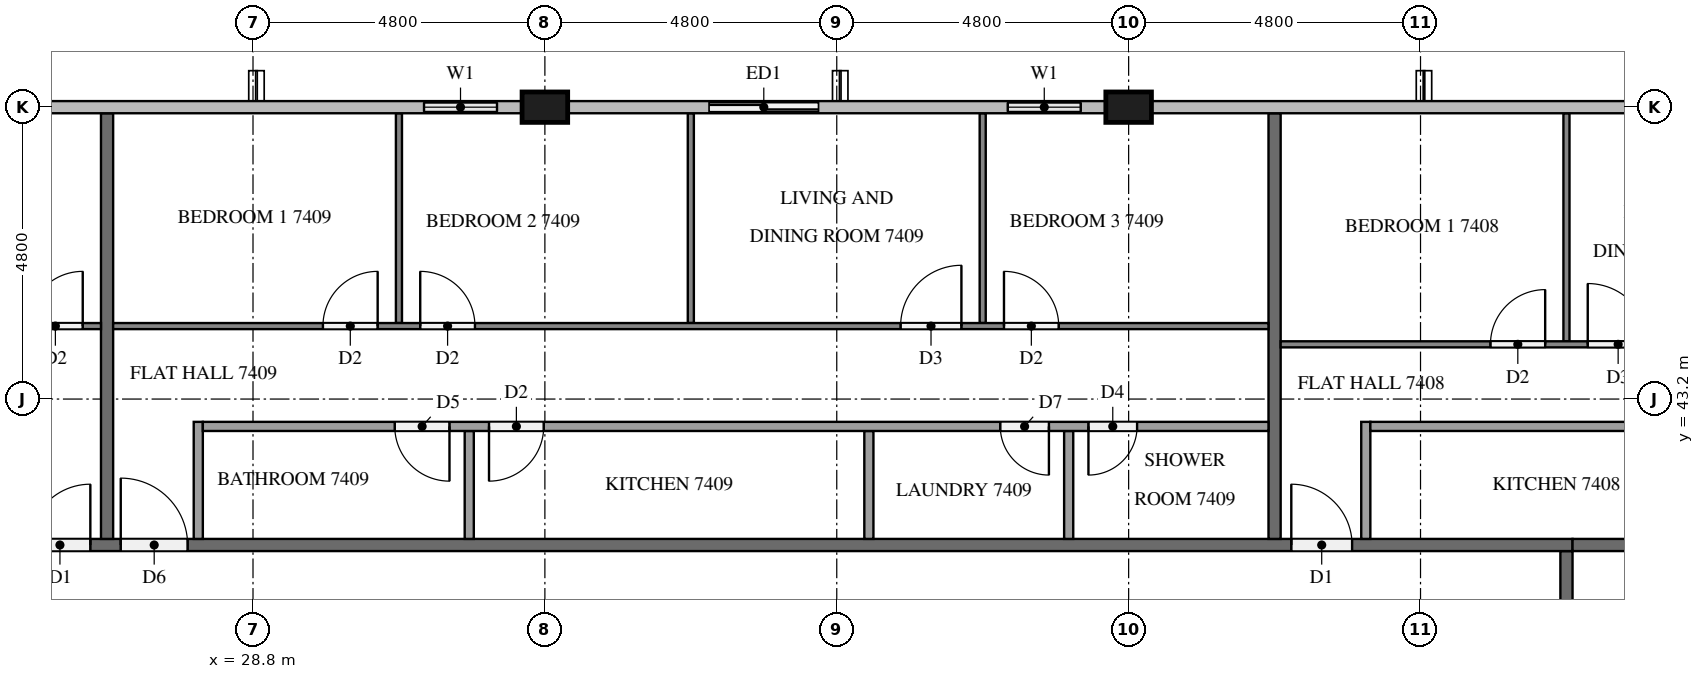
"""IFC4 building model, lengths in metres.
Left out: names, types, materials, properties, quantities, classifications, styles, units other than length and angle.
Written with IfcOpenShell. Run it as: python <this file> out.ifc"""

import sys

from ifc_helpers import new_model, si_unit, direction, frame, frame_2d, origin, origin_2d, place, context, subcontext, project, spatial, rectangle, extrude, element, fill, save


model = new_model("IFC4")
c1 = context("Model", 3, precision=1e-05, world=origin(), true_north=direction((0.0, 1.0)))
c2 = subcontext(c1, "Body", "Model", "MODEL_VIEW")
j1 = project(units=[si_unit("LENGTHUNIT", "METRE"), si_unit("PLANEANGLEUNIT", "RADIAN")], contexts=[c1])
p1 = place(None, origin())
s1 = spatial("IfcSite", under=j1, at=p1, CompositionType="ELEMENT")
p2 = place(p1, origin())
s2 = spatial("IfcBuilding", under=s1, at=p2, CompositionType="ELEMENT")
p3 = place(p2, frame((0.0, 0.0, 282.6)))
s3 = spatial("IfcBuildingStorey", under=s2, at=p3, CompositionType="ELEMENT", Elevation=282.6)
for number, where, z_axis, x_axis in (
    (1, (43.2, 48.0, 0.0), (0.0, 0.0, 1.0), (1.0, 0.0, 0.0)),
    (2, (33.6, 48.0, 0.0), (0.0, 0.0, 1.0), (1.0, 0.0, 0.0)),
):
    element("IfcColumn", number, at=place(p3, frame(where, z_axis=z_axis, x_axis=x_axis)), inside=s3, PredefinedType="COLUMN", context=c2, shape_type="SweptSolid", body=[
        extrude(rectangle(XDim=0.75, YDim=0.5, at=origin_2d()), origin(), (0.0, 0.0, 1.0), 3.2),
    ])
p4 = place(p3, frame((42.825, 48.0, 0.0), z_axis=(0.0, 0.0, 1.0), x_axis=(-1.0, 0.0, 0.0)))
e3 = element("IfcWall", 3, at=p4, inside=s3, PredefinedType="SOLIDWALL", context=c2, shape_type="SweptSolid", body=[
    extrude(rectangle(XDim=2.025, YDim=0.15, at=frame_2d((1.012, 0.0))), origin(), (0.0, 0.0, 1.0), 3.2),
])
p5 = place(p4, frame((0.413, 0.0, 0.9)))
e4 = element("IfcOpeningElement", 4, at=p5, cuts=e3, PredefinedType="OPENING", context=c2, shape_type="SweptSolid", body=[
    extrude(rectangle(XDim=1.2, YDim=1.4, at=frame_2d((0.6, 0.7))), frame((0.0, 0.085, 0.0), z_axis=(0.0, -1.0, 0.0), x_axis=(1.0, 0.0, 0.0)), (0.0, 0.0, 1.0), 0.17),
])
p6 = place(p3, frame((38.4, 48.0, 0.0), z_axis=(0.0, 0.0, 1.0), x_axis=(-1.0, 0.0, 0.0)))
e5 = element("IfcWall", 5, at=p6, inside=s3, PredefinedType="SOLIDWALL", context=c2, shape_type="SweptSolid", body=[
    extrude(rectangle(XDim=2.4, YDim=0.15, at=frame_2d((1.2, 0.0))), origin(), (0.0, 0.0, 1.0), 3.2),
])
p7 = place(p6, frame((0.3, 0.0, 0.0)))
e6 = element("IfcOpeningElement", 6, at=p7, cuts=e5, PredefinedType="OPENING", context=c2, shape_type="SweptSolid", body=[
    extrude(rectangle(XDim=1.8, YDim=2.4, at=frame_2d((0.9, 1.2))), frame((0.0, 0.085, 0.0), z_axis=(0.0, -1.0, 0.0), x_axis=(1.0, 0.0, 0.0)), (0.0, 0.0, 1.0), 0.17),
])
p8 = place(p3, frame((33.225, 48.0, 0.0), z_axis=(0.0, 0.0, 1.0), x_axis=(-1.0, 0.0, 0.0)))
e7 = element("IfcWall", 7, at=p8, inside=s3, PredefinedType="SOLIDWALL", context=c2, shape_type="SweptSolid", body=[
    extrude(rectangle(XDim=2.025, YDim=0.15, at=frame_2d((1.013, 0.0))), origin(), (0.0, 0.0, 1.0), 3.2),
])
p9 = place(p8, frame((0.413, 0.0, 0.9)))
e8 = element("IfcOpeningElement", 8, at=p9, cuts=e7, PredefinedType="OPENING", context=c2, shape_type="SweptSolid", body=[
    extrude(rectangle(XDim=1.2, YDim=1.4, at=frame_2d((0.6, 0.7))), frame((0.0, 0.085, 0.0), z_axis=(0.0, -1.0, 0.0), x_axis=(1.0, 0.0, 0.0)), (0.0, 0.0, 1.0), 0.17),
])
p10 = place(p3, frame((50.4, 40.7, 0.0), z_axis=(0.0, 0.0, 1.0), x_axis=(0.0, -1.0, 0.0)))
e9 = element("IfcWall", 9, at=p10, inside=s3, PredefinedType="PARTITIONING", context=c2, shape_type="SweptSolid", body=[
    extrude(rectangle(XDim=28.6, YDim=0.2, at=frame_2d((14.3, 0.0))), origin(), (0.0, 0.0, 1.0), 3.2),
])
p11 = place(p10, frame((27.425, 0.0, 0.0)))
e10 = element("IfcOpeningElement", 10, at=p11, cuts=e9, PredefinedType="OPENING", context=c2, shape_type="SweptSolid", body=[
    extrude(rectangle(XDim=1.0, YDim=2.1, at=frame_2d((0.5, 1.05))), frame((0.0, 0.11, 0.0), z_axis=(0.0, -1.0, 0.0), x_axis=(1.0, 0.0, 0.0)), (0.0, 0.0, 1.0), 0.22),
])
p12 = place(p10, frame((13.025, 0.0, 0.0)))
e11 = element("IfcOpeningElement", 11, at=p12, cuts=e9, PredefinedType="OPENING", context=c2, shape_type="SweptSolid", body=[
    extrude(rectangle(XDim=1.0, YDim=2.1, at=frame_2d((0.5, 1.05))), frame((0.0, 0.11, 0.0), z_axis=(0.0, -1.0, 0.0), x_axis=(1.0, 0.0, 0.0)), (0.0, 0.0, 1.0), 0.22),
])
p13 = place(p3, frame((11.9, 40.8, 0.0), z_axis=(0.0, 0.0, 1.0), x_axis=(1.0, 0.0, 0.0)))
e12 = element("IfcWall", 12, at=p13, inside=s3, PredefinedType="PARTITIONING", context=c2, shape_type="SweptSolid", body=[
    extrude(rectangle(XDim=38.6, YDim=0.2, at=frame_2d((19.3, 0.0))), origin(), (0.0, 0.0, 1.0), 3.2),
])
p14 = place(p13, frame((33.975, 0.0, 0.0)))
e13 = element("IfcOpeningElement", 13, at=p14, cuts=e12, PredefinedType="OPENING", context=c2, shape_type="SweptSolid", body=[
    extrude(rectangle(XDim=1.0, YDim=2.1, at=frame_2d((0.5, 1.05))), frame((0.0, 0.11, 0.0), z_axis=(0.0, -1.0, 0.0), x_axis=(1.0, 0.0, 0.0)), (0.0, 0.0, 1.0), 0.22),
])
p15 = place(p13, frame((14.725, 0.0, 0.0)))
e14 = element("IfcOpeningElement", 14, at=p15, cuts=e12, PredefinedType="OPENING", context=c2, shape_type="SweptSolid", body=[
    extrude(rectangle(XDim=1.1, YDim=2.1, at=frame_2d((0.55, 1.05))), frame((0.0, 0.11, 0.0), z_axis=(0.0, -1.0, 0.0), x_axis=(1.0, 0.0, 0.0)), (0.0, 0.0, 1.0), 0.22),
])
p16 = place(p13, frame((13.225, 0.0, 0.0)))
e15 = element("IfcOpeningElement", 15, at=p16, cuts=e12, PredefinedType="OPENING", context=c2, shape_type="SweptSolid", body=[
    extrude(rectangle(XDim=1.0, YDim=2.1, at=frame_2d((0.5, 1.05))), frame((0.0, 0.11, 0.0), z_axis=(0.0, -1.0, 0.0), x_axis=(1.0, 0.0, 0.0)), (0.0, 0.0, 1.0), 0.22),
])
p17 = place(p13, frame((1.225, 0.0, 0.0)))
e16 = element("IfcOpeningElement", 16, at=p17, cuts=e12, PredefinedType="OPENING", context=c2, shape_type="SweptSolid", body=[
    extrude(rectangle(XDim=1.0, YDim=2.1, at=frame_2d((0.5, 1.05))), frame((0.0, 0.11, 0.0), z_axis=(0.0, -1.0, 0.0), x_axis=(1.0, 0.0, 0.0)), (0.0, 0.0, 1.0), 0.22),
])
for number, where, z_axis, x_axis in (
    (17, (50.5, 40.8, 0.0), (0.0, 0.0, 1.0), (1.0, 0.0, 0.0)),
    (18, (45.6, 47.9, 0.0), (0.0, 0.0, 1.0), (0.0, -1.0, 0.0)),
    (19, (26.4, 47.9, 0.0), (0.0, 0.0, 1.0), (0.0, -1.0, 0.0)),
):
    element("IfcWall", number, at=place(p3, frame(where, z_axis=z_axis, x_axis=x_axis)), inside=s3, PredefinedType="PARTITIONING", context=c2, shape_type="SweptSolid", body=[
        extrude(rectangle(XDim=7.0, YDim=0.2, at=frame_2d((3.5, 0.0))), origin(), (0.0, 0.0, 1.0), 3.2),
    ])
p18 = place(p3, frame((50.4, 44.15, 0.0), z_axis=(0.0, 0.0, 1.0), x_axis=(0.0, 1.0, 0.0)))
e20 = element("IfcWall", 20, at=p18, inside=s3, PredefinedType="PARTITIONING", context=c2, shape_type="SweptSolid", body=[
    extrude(rectangle(XDim=3.75, YDim=0.1, at=frame_2d((1.875, 0.0))), origin(), (0.0, 0.0, 1.0), 3.2),
])
p19 = place(p3, frame((45.7, 44.1, 0.0), z_axis=(0.0, 0.0, 1.0), x_axis=(1.0, 0.0, 0.0)))
e21 = element("IfcWall", 21, at=p19, inside=s3, PredefinedType="PARTITIONING", context=c2, shape_type="SweptSolid", body=[
    extrude(rectangle(XDim=11.559, YDim=0.1, at=frame_2d((5.779, 0.0))), origin(), (0.0, 0.0, 1.0), 3.2),
])
p20 = place(p19, frame((3.45, 0.0, 0.0)))
e22 = element("IfcOpeningElement", 22, at=p20, cuts=e21, PredefinedType="OPENING", context=c2, shape_type="SweptSolid", body=[
    extrude(rectangle(XDim=0.9, YDim=2.1, at=frame_2d((0.45, 1.05))), frame((0.0, 0.06, 0.0), z_axis=(0.0, -1.0, 0.0), x_axis=(1.0, 0.0, 0.0)), (0.0, 0.0, 1.0), 0.12),
])
p21 = place(p19, frame((5.05, 0.0, 0.0)))
e23 = element("IfcOpeningElement", 23, at=p21, cuts=e21, PredefinedType="OPENING", context=c2, shape_type="SweptSolid", body=[
    extrude(rectangle(XDim=1.0, YDim=2.1, at=frame_2d((0.5, 1.05))), frame((0.0, 0.06, 0.0), z_axis=(0.0, -1.0, 0.0), x_axis=(1.0, 0.0, 0.0)), (0.0, 0.0, 1.0), 0.12),
])
p22 = place(p3, frame((47.1, 40.9, 0.0), z_axis=(0.0, 0.0, 1.0), x_axis=(0.0, 1.0, 0.0)))
e24 = element("IfcWall", 24, at=p22, inside=s3, PredefinedType="PARTITIONING", context=c2, shape_type="SweptSolid", body=[
    extrude(rectangle(XDim=1.925, YDim=0.15, at=frame_2d((0.962, 0.0))), origin(), (0.0, 0.0, 1.0), 3.2),
])
p23 = place(p3, frame((57.5, 42.75, 0.0), z_axis=(0.0, 0.0, 1.0), x_axis=(-1.0, 0.0, 0.0)))
e25 = element("IfcWall", 25, at=p23, inside=s3, PredefinedType="PARTITIONING", context=c2, shape_type="SweptSolid", body=[
    extrude(rectangle(XDim=10.325, YDim=0.15, at=frame_2d((5.163, 0.0))), origin(), (0.0, 0.0, 1.0), 3.2),
])
p24 = place(p23, frame((4.455, 0.0, 0.0)))
e26 = element("IfcOpeningElement", 26, at=p24, cuts=e25, PredefinedType="OPENING", context=c2, shape_type="SweptSolid", body=[
    extrude(rectangle(XDim=0.9, YDim=2.1, at=frame_2d((0.45, 1.05))), frame((0.0, 0.085, 0.0), z_axis=(0.0, -1.0, 0.0), x_axis=(1.0, 0.0, 0.0)), (0.0, 0.0, 1.0), 0.17),
])
p25 = place(p23, frame((3.005, 0.0, 0.0)))
e27 = element("IfcOpeningElement", 27, at=p25, cuts=e25, PredefinedType="OPENING", context=c2, shape_type="SweptSolid", body=[
    extrude(rectangle(XDim=0.8, YDim=2.1, at=frame_2d((0.4, 1.05))), frame((0.0, 0.085, 0.0), z_axis=(0.0, -1.0, 0.0), x_axis=(1.0, 0.0, 0.0)), (0.0, 0.0, 1.0), 0.17),
])
for number, where, z_axis, x_axis in (
    (28, (31.2, 44.45, 0.0), (0.0, 0.0, 1.0), (0.0, 1.0, 0.0)),
    (29, (36.0, 44.45, 0.0), (0.0, 0.0, 1.0), (0.0, 1.0, 0.0)),
    (30, (40.8, 44.45, 0.0), (0.0, 0.0, 1.0), (0.0, 1.0, 0.0)),
):
    element("IfcWall", number, at=place(p3, frame(where, z_axis=z_axis, x_axis=x_axis)), inside=s3, PredefinedType="PARTITIONING", context=c2, shape_type="SweptSolid", body=[
        extrude(rectangle(XDim=3.45, YDim=0.1, at=frame_2d((1.725, 0.0))), origin(), (0.0, 0.0, 1.0), 3.2),
    ])
p26 = place(p3, frame((26.5, 44.4, 0.0), z_axis=(0.0, 0.0, 1.0), x_axis=(1.0, 0.0, 0.0)))
e31 = element("IfcWall", 31, at=p26, inside=s3, PredefinedType="PARTITIONING", context=c2, shape_type="SweptSolid", body=[
    extrude(rectangle(XDim=19.0, YDim=0.1, at=frame_2d((9.5, 0.0))), origin(), (0.0, 0.0, 1.0), 3.2),
])
p27 = place(p26, frame((3.45, 0.0, 0.0)))
e32 = element("IfcOpeningElement", 32, at=p27, cuts=e31, PredefinedType="OPENING", context=c2, shape_type="SweptSolid", body=[
    extrude(rectangle(XDim=0.9, YDim=2.1, at=frame_2d((0.45, 1.05))), frame((0.0, 0.06, 0.0), z_axis=(0.0, -1.0, 0.0), x_axis=(1.0, 0.0, 0.0)), (0.0, 0.0, 1.0), 0.12),
])
p28 = place(p26, frame((5.05, 0.0, 0.0)))
e33 = element("IfcOpeningElement", 33, at=p28, cuts=e31, PredefinedType="OPENING", context=c2, shape_type="SweptSolid", body=[
    extrude(rectangle(XDim=0.9, YDim=2.1, at=frame_2d((0.45, 1.05))), frame((0.0, 0.06, 0.0), z_axis=(0.0, -1.0, 0.0), x_axis=(1.0, 0.0, 0.0)), (0.0, 0.0, 1.0), 0.12),
])
p29 = place(p26, frame((12.95, 0.0, 0.0)))
e34 = element("IfcOpeningElement", 34, at=p29, cuts=e31, PredefinedType="OPENING", context=c2, shape_type="SweptSolid", body=[
    extrude(rectangle(XDim=1.0, YDim=2.1, at=frame_2d((0.5, 1.05))), frame((0.0, 0.06, 0.0), z_axis=(0.0, -1.0, 0.0), x_axis=(1.0, 0.0, 0.0)), (0.0, 0.0, 1.0), 0.12),
])
p30 = place(p26, frame((14.65, 0.0, 0.0)))
e35 = element("IfcOpeningElement", 35, at=p30, cuts=e31, PredefinedType="OPENING", context=c2, shape_type="SweptSolid", body=[
    extrude(rectangle(XDim=0.9, YDim=2.1, at=frame_2d((0.45, 1.05))), frame((0.0, 0.06, 0.0), z_axis=(0.0, -1.0, 0.0), x_axis=(1.0, 0.0, 0.0)), (0.0, 0.0, 1.0), 0.12),
])
for number, where, z_axis, x_axis in (
    (36, (32.356, 40.9, 0.0), (0.0, 0.0, 1.0), (0.0, 1.0, 0.0)),
    (37, (38.928, 40.9, 0.0), (0.0, 0.0, 1.0), (0.0, 1.0, 0.0)),
    (38, (42.214, 40.9, 0.0), (0.0, 0.0, 1.0), (0.0, 1.0, 0.0)),
):
    element("IfcWall", number, at=place(p3, frame(where, z_axis=z_axis, x_axis=x_axis)), inside=s3, PredefinedType="PARTITIONING", context=c2, shape_type="SweptSolid", body=[
        extrude(rectangle(XDim=1.775, YDim=0.15, at=frame_2d((0.888, 0.0))), origin(), (0.0, 0.0, 1.0), 3.2),
    ])
p31 = place(p3, frame((27.9, 40.9, 0.0), z_axis=(0.0, 0.0, 1.0), x_axis=(0.0, 1.0, 0.0)))
e39 = element("IfcWall", 39, at=p31, inside=s3, PredefinedType="PARTITIONING", context=c2, shape_type="SweptSolid", body=[
    extrude(rectangle(XDim=1.925, YDim=0.15, at=frame_2d((0.962, 0.0))), origin(), (0.0, 0.0, 1.0), 3.2),
])
p32 = place(p3, frame((45.5, 42.75, 0.0), z_axis=(0.0, 0.0, 1.0), x_axis=(-1.0, 0.0, 0.0)))
e40 = element("IfcWall", 40, at=p32, inside=s3, PredefinedType="PARTITIONING", context=c2, shape_type="SweptSolid", body=[
    extrude(rectangle(XDim=17.525, YDim=0.15, at=frame_2d((8.762, 0.0))), origin(), (0.0, 0.0, 1.0), 3.2),
])
p33 = place(p32, frame((13.469, 0.0, 0.0)))
e41 = element("IfcOpeningElement", 41, at=p33, cuts=e40, PredefinedType="OPENING", context=c2, shape_type="SweptSolid", body=[
    extrude(rectangle(XDim=0.9, YDim=2.1, at=frame_2d((0.45, 1.05))), frame((0.0, 0.085, 0.0), z_axis=(0.0, -1.0, 0.0), x_axis=(1.0, 0.0, 0.0)), (0.0, 0.0, 1.0), 0.17),
])
p34 = place(p32, frame((11.919, 0.0, 0.0)))
e42 = element("IfcOpeningElement", 42, at=p34, cuts=e40, PredefinedType="OPENING", context=c2, shape_type="SweptSolid", body=[
    extrude(rectangle(XDim=0.9, YDim=2.1, at=frame_2d((0.45, 1.05))), frame((0.0, 0.085, 0.0), z_axis=(0.0, -1.0, 0.0), x_axis=(1.0, 0.0, 0.0)), (0.0, 0.0, 1.0), 0.17),
])
p35 = place(p32, frame((3.611, 0.0, 0.0)))
e43 = element("IfcOpeningElement", 43, at=p35, cuts=e40, PredefinedType="OPENING", context=c2, shape_type="SweptSolid", body=[
    extrude(rectangle(XDim=0.8, YDim=2.1, at=frame_2d((0.4, 1.05))), frame((0.0, 0.085, 0.0), z_axis=(0.0, -1.0, 0.0), x_axis=(1.0, 0.0, 0.0)), (0.0, 0.0, 1.0), 0.17),
])
p36 = place(p32, frame((2.161, 0.0, 0.0)))
e44 = element("IfcOpeningElement", 44, at=p36, cuts=e40, PredefinedType="OPENING", context=c2, shape_type="SweptSolid", body=[
    extrude(rectangle(XDim=0.8, YDim=2.1, at=frame_2d((0.4, 1.05))), frame((0.0, 0.085, 0.0), z_axis=(0.0, -1.0, 0.0), x_axis=(1.0, 0.0, 0.0)), (0.0, 0.0, 1.0), 0.17),
])
p37 = place(p3, frame((14.5, 44.4, 0.0), z_axis=(0.0, 0.0, 1.0), x_axis=(1.0, 0.0, 0.0)))
e45 = element("IfcWall", 45, at=p37, inside=s3, PredefinedType="PARTITIONING", context=c2, shape_type="SweptSolid", body=[
    extrude(rectangle(XDim=11.8, YDim=0.1, at=frame_2d((5.9, 0.0))), origin(), (0.0, 0.0, 1.0), 3.2),
])
p38 = place(p37, frame((10.6, 0.0, 0.0)))
e46 = element("IfcOpeningElement", 46, at=p38, cuts=e45, PredefinedType="OPENING", context=c2, shape_type="SweptSolid", body=[
    extrude(rectangle(XDim=0.9, YDim=2.1, at=frame_2d((0.45, 1.05))), frame((0.0, 0.06, 0.0), z_axis=(0.0, -1.0, 0.0), x_axis=(1.0, 0.0, 0.0)), (0.0, 0.0, 1.0), 0.12),
])
p39 = place(p37, frame((0.3, 0.0, 0.0)))
e47 = element("IfcOpeningElement", 47, at=p39, cuts=e45, PredefinedType="OPENING", context=c2, shape_type="SweptSolid", body=[
    extrude(rectangle(XDim=1.0, YDim=2.1, at=frame_2d((0.5, 1.05))), frame((0.0, 0.06, 0.0), z_axis=(0.0, -1.0, 0.0), x_axis=(1.0, 0.0, 0.0)), (0.0, 0.0, 1.0), 0.12),
])
p40 = place(p5, origin())
e48 = element("IfcWindow", 48, at=p40, inside=s3, PartitioningType="SINGLE_PANEL", PredefinedType="WINDOW", context=c2, shape_type="SweptSolid", body=[
    extrude(rectangle(XDim=1.2, YDim=1.4, at=frame_2d((0.6, 0.7))), frame((0.0, 0.03, 0.0), z_axis=(0.0, -1.0, 0.0), x_axis=(1.0, 0.0, 0.0)), (0.0, 0.0, 1.0), 0.06),
])
fill(e4, e48)
p41 = place(p7, origin())
e49 = element("IfcDoor", 49, at=p41, inside=s3, OperationType="SLIDING_TO_LEFT", PredefinedType="DOOR", context=c2, shape_type="SweptSolid", body=[
    extrude(rectangle(XDim=1.8, YDim=2.4, at=frame_2d((0.9, 1.2))), frame((0.0, 0.025, 0.0), z_axis=(0.0, -1.0, 0.0), x_axis=(1.0, 0.0, 0.0)), (0.0, 0.0, 1.0), 0.05),
])
fill(e6, e49)
p42 = place(p9, origin())
e50 = element("IfcWindow", 50, at=p42, inside=s3, PartitioningType="SINGLE_PANEL", PredefinedType="WINDOW", context=c2, shape_type="SweptSolid", body=[
    extrude(rectangle(XDim=1.2, YDim=1.4, at=frame_2d((0.6, 0.7))), frame((0.0, 0.03, 0.0), z_axis=(0.0, -1.0, 0.0), x_axis=(1.0, 0.0, 0.0)), (0.0, 0.0, 1.0), 0.06),
])
fill(e8, e50)
p43 = place(p14, origin())
e51 = element("IfcDoor", 51, at=p43, inside=s3, OperationType="SINGLE_SWING_LEFT", PredefinedType="DOOR", context=c2, shape_type="SweptSolid", body=[
    extrude(rectangle(XDim=1.0, YDim=2.1, at=frame_2d((0.5, 1.05))), frame((0.0, 0.025, 0.0), z_axis=(0.0, -1.0, 0.0), x_axis=(1.0, 0.0, 0.0)), (0.0, 0.0, 1.0), 0.05),
])
fill(e13, e51)
p44 = place(p15, origin())
e52 = element("IfcDoor", 52, at=p44, inside=s3, OperationType="SINGLE_SWING_LEFT", PredefinedType="DOOR", context=c2, shape_type="SweptSolid", body=[
    extrude(rectangle(XDim=1.1, YDim=2.1, at=frame_2d((0.55, 1.05))), frame((0.0, 0.025, 0.0), z_axis=(0.0, -1.0, 0.0), x_axis=(1.0, 0.0, 0.0)), (0.0, 0.0, 1.0), 0.05),
])
fill(e14, e52)
p45 = place(p16, origin())
e53 = element("IfcDoor", 53, at=p45, inside=s3, OperationType="SINGLE_SWING_RIGHT", PredefinedType="DOOR", context=c2, shape_type="SweptSolid", body=[
    extrude(rectangle(XDim=1.0, YDim=2.1, at=frame_2d((0.5, 1.05))), frame((0.0, 0.025, 0.0), z_axis=(0.0, -1.0, 0.0), x_axis=(1.0, 0.0, 0.0)), (0.0, 0.0, 1.0), 0.05),
])
fill(e15, e53)
p46 = place(p20, origin())
e54 = element("IfcDoor", 54, at=p46, inside=s3, OperationType="SINGLE_SWING_RIGHT", PredefinedType="DOOR", context=c2, shape_type="SweptSolid", body=[
    extrude(rectangle(XDim=0.9, YDim=2.1, at=frame_2d((0.45, 1.05))), frame((0.0, 0.025, 0.0), z_axis=(0.0, -1.0, 0.0), x_axis=(1.0, 0.0, 0.0)), (0.0, 0.0, 1.0), 0.05),
])
fill(e22, e54)
p47 = place(p21, origin())
e55 = element("IfcDoor", 55, at=p47, inside=s3, OperationType="SINGLE_SWING_LEFT", PredefinedType="DOOR", context=c2, shape_type="SweptSolid", body=[
    extrude(rectangle(XDim=1.0, YDim=2.1, at=frame_2d((0.5, 1.05))), frame((0.0, 0.025, 0.0), z_axis=(0.0, -1.0, 0.0), x_axis=(1.0, 0.0, 0.0)), (0.0, 0.0, 1.0), 0.05),
])
fill(e23, e55)
p48 = place(p27, origin())
e56 = element("IfcDoor", 56, at=p48, inside=s3, OperationType="SINGLE_SWING_RIGHT", PredefinedType="DOOR", context=c2, shape_type="SweptSolid", body=[
    extrude(rectangle(XDim=0.9, YDim=2.1, at=frame_2d((0.45, 1.05))), frame((0.0, 0.025, 0.0), z_axis=(0.0, -1.0, 0.0), x_axis=(1.0, 0.0, 0.0)), (0.0, 0.0, 1.0), 0.05),
])
fill(e32, e56)
p49 = place(p28, origin())
e57 = element("IfcDoor", 57, at=p49, inside=s3, OperationType="SINGLE_SWING_LEFT", PredefinedType="DOOR", context=c2, shape_type="SweptSolid", body=[
    extrude(rectangle(XDim=0.9, YDim=2.1, at=frame_2d((0.45, 1.05))), frame((0.0, 0.025, 0.0), z_axis=(0.0, -1.0, 0.0), x_axis=(1.0, 0.0, 0.0)), (0.0, 0.0, 1.0), 0.05),
])
fill(e33, e57)
p50 = place(p29, origin())
e58 = element("IfcDoor", 58, at=p50, inside=s3, OperationType="SINGLE_SWING_RIGHT", PredefinedType="DOOR", context=c2, shape_type="SweptSolid", body=[
    extrude(rectangle(XDim=1.0, YDim=2.1, at=frame_2d((0.5, 1.05))), frame((0.0, 0.025, 0.0), z_axis=(0.0, -1.0, 0.0), x_axis=(1.0, 0.0, 0.0)), (0.0, 0.0, 1.0), 0.05),
])
fill(e34, e58)
p51 = place(p30, origin())
e59 = element("IfcDoor", 59, at=p51, inside=s3, OperationType="SINGLE_SWING_LEFT", PredefinedType="DOOR", context=c2, shape_type="SweptSolid", body=[
    extrude(rectangle(XDim=0.9, YDim=2.1, at=frame_2d((0.45, 1.05))), frame((0.0, 0.025, 0.0), z_axis=(0.0, -1.0, 0.0), x_axis=(1.0, 0.0, 0.0)), (0.0, 0.0, 1.0), 0.05),
])
fill(e35, e59)
p52 = place(p33, origin())
e60 = element("IfcDoor", 60, at=p52, inside=s3, OperationType="SINGLE_SWING_LEFT", PredefinedType="DOOR", context=c2, shape_type="SweptSolid", body=[
    extrude(rectangle(XDim=0.9, YDim=2.1, at=frame_2d((0.45, 1.05))), frame((0.0, 0.025, 0.0), z_axis=(0.0, -1.0, 0.0), x_axis=(1.0, 0.0, 0.0)), (0.0, 0.0, 1.0), 0.05),
])
fill(e41, e60)
p53 = place(p34, origin())
e61 = element("IfcDoor", 61, at=p53, inside=s3, OperationType="SINGLE_SWING_RIGHT", PredefinedType="DOOR", context=c2, shape_type="SweptSolid", body=[
    extrude(rectangle(XDim=0.9, YDim=2.1, at=frame_2d((0.45, 1.05))), frame((0.0, 0.025, 0.0), z_axis=(0.0, -1.0, 0.0), x_axis=(1.0, 0.0, 0.0)), (0.0, 0.0, 1.0), 0.05),
])
fill(e42, e61)
p54 = place(p35, origin())
e62 = element("IfcDoor", 62, at=p54, inside=s3, OperationType="SINGLE_SWING_LEFT", PredefinedType="DOOR", context=c2, shape_type="SweptSolid", body=[
    extrude(rectangle(XDim=0.8, YDim=2.1, at=frame_2d((0.4, 1.05))), frame((0.0, 0.025, 0.0), z_axis=(0.0, -1.0, 0.0), x_axis=(1.0, 0.0, 0.0)), (0.0, 0.0, 1.0), 0.05),
])
fill(e43, e62)
p55 = place(p36, origin())
e63 = element("IfcDoor", 63, at=p55, inside=s3, OperationType="SINGLE_SWING_RIGHT", PredefinedType="DOOR", context=c2, shape_type="SweptSolid", body=[
    extrude(rectangle(XDim=0.8, YDim=2.1, at=frame_2d((0.4, 1.05))), frame((0.0, 0.025, 0.0), z_axis=(0.0, -1.0, 0.0), x_axis=(1.0, 0.0, 0.0)), (0.0, 0.0, 1.0), 0.05),
])
fill(e44, e63)
p56 = place(p38, origin())
e64 = element("IfcDoor", 64, at=p56, inside=s3, OperationType="SINGLE_SWING_RIGHT", PredefinedType="DOOR", context=c2, shape_type="SweptSolid", body=[
    extrude(rectangle(XDim=0.9, YDim=2.1, at=frame_2d((0.45, 1.05))), frame((0.0, 0.025, 0.0), z_axis=(0.0, -1.0, 0.0), x_axis=(1.0, 0.0, 0.0)), (0.0, 0.0, 1.0), 0.05),
])
fill(e46, e64)
save(model, sys.argv[1])
